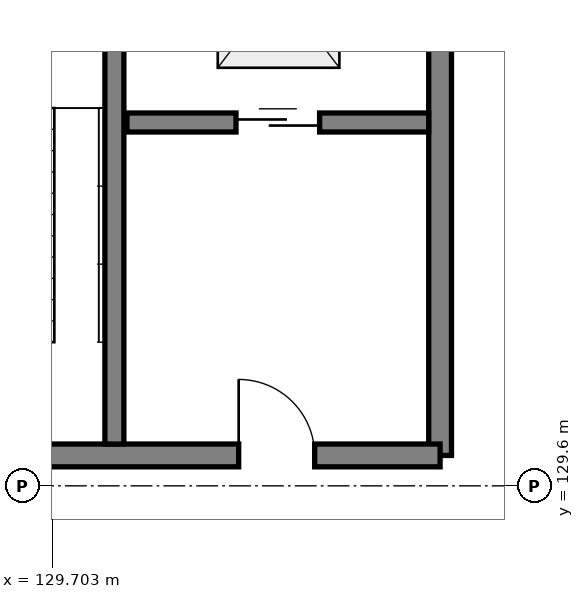
"""IFC4 building model, lengths in metres.
Left out: names, types, materials, properties, quantities, classifications, styles, units other than length and angle.
Written with IfcOpenShell. Run it as: python <this file> out.ifc"""

import sys

from ifc_helpers import new_model, si_unit, direction, frame, frame_2d, origin, place, context, subcontext, project, spatial, rectangle, extrude, element, fill, save


model = new_model("IFC4")
c1 = context("Model", 3, precision=1e-05, world=origin(), true_north=direction((0.0, 1.0)))
c2 = subcontext(c1, "Body", "Model", "MODEL_VIEW")
j1 = project(units=[si_unit("LENGTHUNIT", "METRE"), si_unit("PLANEANGLEUNIT", "RADIAN")], contexts=[c1])
p1 = place(None, origin())
s1 = spatial("IfcSite", under=j1, at=p1, CompositionType="ELEMENT")
p2 = place(p1, origin())
s2 = spatial("IfcBuilding", under=s1, at=p2, CompositionType="ELEMENT")
p3 = place(p2, frame((0.0, 0.0, -4.5)))
s3 = spatial("IfcBuildingStorey", under=s2, at=p3, CompositionType="ELEMENT", Elevation=-4.5)
p4 = place(p3, frame((134.8, 130.0, 0.0), z_axis=(0.0, 0.0, 1.0), x_axis=(0.0, 1.0, 0.0)))
e1 = element("IfcWall", 1, at=p4, inside=s3, PredefinedType="SHEAR", context=c2, shape_type="SweptSolid", body=[
    extrude(rectangle(XDim=8.0, YDim=0.3, at=frame_2d((4.0, 0.0), x_axis=(1.0, 0.0))), origin(), (0.0, 0.0, 1.0), 4.5),
])
p5 = place(p3, frame((127.4, 130.0, 0.0), z_axis=(0.0, 0.0, 1.0), x_axis=(1.0, 0.0, 0.0)))
e2 = element("IfcWall", 2, at=p5, inside=s3, PredefinedType="SHEAR", context=c2, shape_type="SweptSolid", body=[
    extrude(rectangle(XDim=7.4, YDim=0.3, at=frame_2d((3.7, 0.0), x_axis=(1.0, 0.0))), origin(), (0.0, 0.0, 1.0), 4.5),
])
p6 = place(p5, frame((1.1, 0.0, 0.0)))
e3 = element("IfcOpeningElement", 3, at=p6, cuts=e2, PredefinedType="OPENING", context=c2, shape_type="SweptSolid", body=[
    extrude(rectangle(XDim=1.0, YDim=2.15, at=frame_2d((0.5, 1.075), x_axis=(1.0, 0.0))), frame((0.0, 0.16, 0.0), z_axis=(0.0, -1.0, 0.0), x_axis=(1.0, 0.0, 0.0)), (0.0, 0.0, 1.0), 0.32),
])
p7 = place(p5, frame((4.75, 0.0, 0.0)))
e4 = element("IfcOpeningElement", 4, at=p7, cuts=e2, PredefinedType="OPENING", context=c2, shape_type="SweptSolid", body=[
    extrude(rectangle(XDim=1.0, YDim=2.15, at=frame_2d((0.5, 1.075), x_axis=(1.0, 0.0))), frame((0.0, 0.16, 0.0), z_axis=(0.0, -1.0, 0.0), x_axis=(1.0, 0.0, 0.0)), (0.0, 0.0, 1.0), 0.32),
])
p8 = place(p3, frame((130.515, 130.15, 0.0), z_axis=(0.0, 0.0, 1.0), x_axis=(0.0, 1.0, 0.0)))
e5 = element("IfcWall", 5, at=p8, inside=s3, PredefinedType="SHEAR", context=c2, shape_type="SweptSolid", body=[
    extrude(rectangle(XDim=7.7, YDim=0.25, at=frame_2d((3.85, 0.0), x_axis=(1.0, 0.0))), origin(), (0.0, 0.0, 1.0), 4.5),
])
p9 = place(p3, frame((130.68, 134.38, 0.0), z_axis=(0.0, 0.0, 1.0), x_axis=(1.0, 0.0, 0.0)))
e6 = element("IfcWall", 6, at=p9, inside=s3, PredefinedType="SHEAR", context=c2, shape_type="SweptSolid", body=[
    extrude(rectangle(XDim=3.97, YDim=0.25, at=frame_2d((1.985, 0.0), x_axis=(1.0, 0.0))), origin(), (0.0, 0.0, 1.0), 4.2),
])
p10 = place(p9, frame((1.435, 0.0, 0.0)))
e7 = element("IfcOpeningElement", 7, at=p10, cuts=e6, PredefinedType="OPENING", context=c2, shape_type="SweptSolid", body=[
    extrude(rectangle(XDim=1.1, YDim=2.15, at=frame_2d((0.55, 1.075), x_axis=(1.0, 0.0))), frame((0.0, 0.135, 0.0), z_axis=(0.0, -1.0, 0.0), x_axis=(1.0, 0.0, 0.0)), (0.0, 0.0, 1.0), 0.27),
])
p11 = place(p7, origin())
e8 = element("IfcDoor", 8, at=p11, inside=s3, OperationType="SINGLE_SWING_LEFT", PredefinedType="DOOR", context=c2, shape_type="SweptSolid", body=[
    extrude(rectangle(XDim=1.0, YDim=2.15, at=frame_2d((0.5, 1.075), x_axis=(1.0, 0.0))), frame((0.0, 0.025, 0.0), z_axis=(0.0, -1.0, 0.0), x_axis=(1.0, 0.0, 0.0)), (0.0, 0.0, 1.0), 0.05),
])
fill(e4, e8)
p12 = place(p10, origin())
e9 = element("IfcDoor", 9, at=p12, inside=s3, OperationType="SLIDING_TO_LEFT", PredefinedType="DOOR", context=c2, shape_type="SweptSolid", body=[
    extrude(rectangle(XDim=1.1, YDim=2.15, at=frame_2d((0.55, 1.075), x_axis=(1.0, 0.0))), frame((0.0, 0.025, 0.0), z_axis=(0.0, -1.0, 0.0), x_axis=(1.0, 0.0, 0.0)), (0.0, 0.0, 1.0), 0.05),
])
fill(e7, e9)
save(model, sys.argv[1])
